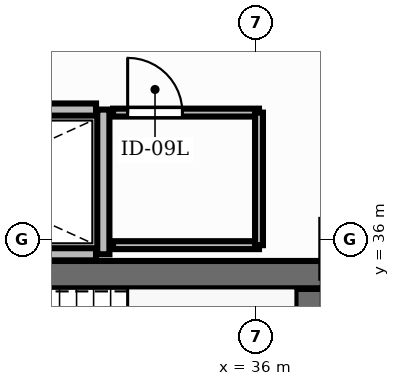
"""IFC4 building model, lengths in metres.
Left out: names, types, materials, properties, quantities, classifications, styles, units other than length and angle.
Written with IfcOpenShell. Run it as: python <this file> out.ifc"""

import sys

from ifc_helpers import new_model, si_unit, direction, frame, frame_2d, origin, place, context, subcontext, project, spatial, rectangle, extrude, element, fill, save


model = new_model("IFC4")
c1 = context("Model", 3, precision=1e-05, world=origin(), true_north=direction((0.0, 1.0)))
c2 = subcontext(c1, "Body", "Model", "MODEL_VIEW")
j1 = project(units=[si_unit("LENGTHUNIT", "METRE"), si_unit("PLANEANGLEUNIT", "RADIAN")], contexts=[c1])
p1 = place(None, origin())
s1 = spatial("IfcSite", under=j1, at=p1, CompositionType="ELEMENT")
p2 = place(p1, origin())
s2 = spatial("IfcBuilding", under=s1, at=p2, CompositionType="ELEMENT")
p3 = place(p2, frame((0.0, 0.0, 10.2)))
s3 = spatial("IfcBuildingStorey", under=s2, at=p3, CompositionType="ELEMENT", Elevation=10.2)
p4 = place(p3, frame((28.852, 35.425, 0.0), z_axis=(0.0, 0.0, 1.0), x_axis=(1.0, 0.0, 0.0)))
e1 = element("IfcWall", 1, at=p4, inside=s3, PredefinedType="SHEAR", context=c2, shape_type="SweptSolid", body=[
    extrude(rectangle(XDim=8.248, YDim=0.45, at=frame_2d((4.124, 0.0))), origin(), (0.0, 0.0, 1.0), 4.45),
])
p5 = place(p3, frame((36.875, 32.11, 0.0), z_axis=(0.0, 0.0, 1.0), x_axis=(0.0, 1.0, 0.0)))
e2 = element("IfcWall", 2, at=p5, inside=s3, PredefinedType="SHEAR", context=c2, shape_type="SweptSolid", body=[
    extrude(rectangle(XDim=3.08, YDim=0.45, at=frame_2d((1.54, 0.0))), origin(), (0.0, 0.0, 1.0), 4.45),
])
p6 = place(p3, frame((33.49, 35.76, 0.0), z_axis=(0.0, 0.0, 1.0), x_axis=(0.0, 1.0, 0.0)))
e3 = element("IfcWall", 3, at=p6, inside=s3, PredefinedType="PARTITIONING", context=c2, shape_type="SweptSolid", body=[
    extrude(rectangle(XDim=2.38, YDim=0.2, at=frame_2d((1.19, 0.0))), origin(), (0.0, 0.0, 1.0), 3.46),
])
for number, where, z_axis, x_axis in (
    (4, (28.8, 35.76, 0.0), (0.0, 0.0, 1.0), (1.0, 0.0, 0.0)),
    (5, (28.8, 38.14, 0.0), (0.0, 0.0, 1.0), (1.0, 0.0, 0.0)),
):
    element("IfcWall", number, at=place(p3, frame(where, z_axis=z_axis, x_axis=x_axis)), inside=s3, PredefinedType="PARTITIONING", context=c2, shape_type="SweptSolid", body=[
        extrude(rectangle(XDim=4.57, YDim=0.2, at=frame_2d((2.285, 0.0))), origin(), (0.0, 0.0, 1.0), 3.46),
    ])
p7 = place(p3, frame((33.65, 38.09, 0.0), z_axis=(0.0, 0.0, 1.0), x_axis=(1.0, 0.0, 0.0)))
e6 = element("IfcWall", 6, at=p7, inside=s3, PredefinedType="PARTITIONING", context=c2, shape_type="SweptSolid", body=[
    extrude(rectangle(XDim=2.4, YDim=0.13, at=frame_2d((1.2, 0.0))), origin(), (0.0, 0.0, 1.0), 3.46),
])
p8 = place(p7, frame((0.24, 0.0, 0.0)))
e7 = element("IfcOpeningElement", 7, at=p8, cuts=e6, PredefinedType="OPENING", context=c2, shape_type="SweptSolid", body=[
    extrude(rectangle(XDim=0.9, YDim=2.15, at=frame_2d((0.45, 1.075))), frame((0.0, 0.08, 0.0), z_axis=(0.0, -1.0, 0.0), x_axis=(1.0, 0.0, 0.0)), (0.0, 0.0, 1.0), 0.16),
])
p9 = place(p3, frame((36.05, 35.91, 0.0), z_axis=(0.0, 0.0, 1.0), x_axis=(-1.0, 0.0, 0.0)))
e8 = element("IfcWall", 8, at=p9, inside=s3, PredefinedType="PARTITIONING", context=c2, shape_type="SweptSolid", body=[
    extrude(rectangle(XDim=2.4, YDim=0.13, at=frame_2d((1.2, 0.0))), origin(), (0.0, 0.0, 1.0), 3.46),
])
p10 = place(p3, frame((36.05, 38.09, 0.0), z_axis=(0.0, 0.0, 1.0), x_axis=(0.0, -1.0, 0.0)))
e9 = element("IfcWall", 9, at=p10, inside=s3, PredefinedType="PARTITIONING", context=c2, shape_type="SweptSolid", body=[
    extrude(rectangle(XDim=2.18, YDim=0.13, at=frame_2d((1.09, 0.0))), origin(), (0.0, 0.0, 1.0), 3.46),
])
p11 = place(p8, origin())
e10 = element("IfcDoor", 10, at=p11, inside=s3, OperationType="SINGLE_SWING_LEFT", PredefinedType="DOOR", context=c2, shape_type="SweptSolid", body=[
    extrude(rectangle(XDim=0.9, YDim=2.15, at=frame_2d((0.45, 1.075))), frame((0.0, 0.025, 0.0), z_axis=(0.0, -1.0, 0.0), x_axis=(1.0, 0.0, 0.0)), (0.0, 0.0, 1.0), 0.05),
])
fill(e7, e10)
save(model, sys.argv[1])
